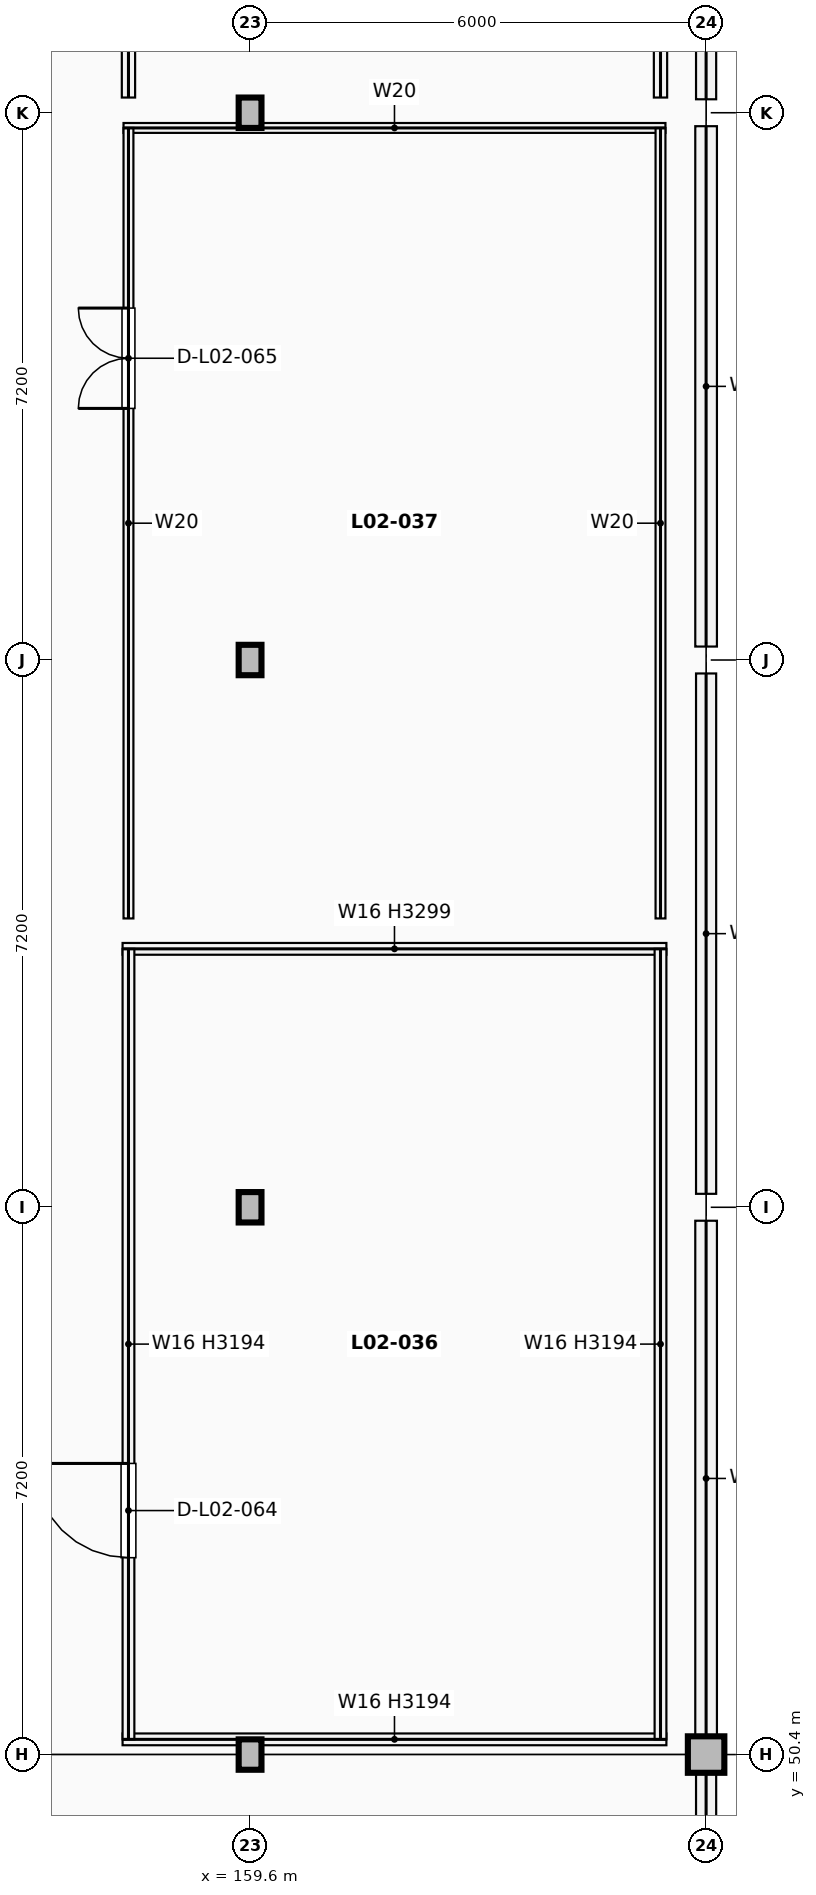
"""IFC4 building model, lengths in metres.
Left out: names, types, materials, properties, quantities, classifications, styles, units other than length and angle.
Written with IfcOpenShell. Run it as: python <this file> out.ifc"""

import sys

from ifc_helpers import new_model, si_unit, direction, frame, frame_2d, origin, origin_2d, place, context, subcontext, project, spatial, rectangle, i_section, extrude, element, fill, save


model = new_model("IFC4")
c1 = context("Model", 3, precision=1e-05, world=origin(), true_north=direction((0.0, 1.0)))
c2 = subcontext(c1, "Body", "Model", "MODEL_VIEW")
j1 = project(units=[si_unit("LENGTHUNIT", "METRE"), si_unit("PLANEANGLEUNIT", "RADIAN")], contexts=[c1])
p1 = place(None, origin())
s1 = spatial("IfcSite", under=j1, at=p1, CompositionType="ELEMENT")
p2 = place(p1, origin())
s2 = spatial("IfcBuilding", under=s1, at=p2, CompositionType="ELEMENT")
p3 = place(p2, frame((0.0, 0.0, 9.52)))
s3 = spatial("IfcBuildingStorey", under=s2, at=p3, CompositionType="ELEMENT", Elevation=9.52)
for number, where, z_axis, x_axis in (
    (1, (159.6, 50.4, 0.0), (0.0, 0.0, 1.0), (1.0, 0.0, 0.0)),
    (2, (159.6, 57.6, 0.0), (0.0, 0.0, 1.0), (1.0, 0.0, 0.0)),
    (3, (159.6, 64.8, 0.0), (0.0, 0.0, 1.0), (1.0, 0.0, 0.0)),
    (4, (159.6, 72.0, 0.0), (0.0, 0.0, 1.0), (1.0, 0.0, 0.0)),
):
    element("IfcColumn", number, at=place(p3, frame(where, z_axis=z_axis, x_axis=x_axis)), inside=s3, PredefinedType="COLUMN", context=c2, shape_type="SweptSolid", body=[
        extrude(i_section(OverallWidth=0.3, OverallDepth=0.4, WebThickness=0.013, FlangeThickness=0.024, at=origin_2d()), origin(), (0.0, 0.0, 1.0), 4.08),
    ])
p4 = place(p3, frame((165.6, 50.4, 0.0), z_axis=(0.0, 0.0, 1.0), x_axis=(1.0, 0.0, 0.0)))
e5 = element("IfcColumn", 5, at=p4, inside=s3, PredefinedType="COLUMN", context=c2, shape_type="SweptSolid", body=[
    extrude(rectangle(XDim=0.48, YDim=0.48, at=origin_2d()), origin(), (0.0, 0.0, 1.0), 4.08),
])
p5 = place(p3, frame((165.6, 44.642, 0.0), z_axis=(0.0, 0.0, 1.0), x_axis=(0.0, 1.0, 0.0)))
e6 = element("IfcWall", 6, at=p5, inside=s3, PredefinedType="SOLIDWALL", context=c2, shape_type="SweptSolid", body=[
    extrude(rectangle(XDim=5.516, YDim=0.265, at=frame_2d((2.758, 0.0))), origin(), (0.0, 0.0, 1.0), 3.194),
])
p6 = place(p3, frame((165.6, 50.642, 0.0), z_axis=(0.0, 0.0, 1.0), x_axis=(0.0, 1.0, 0.0)))
e7 = element("IfcWall", 7, at=p6, inside=s3, PredefinedType="SOLIDWALL", context=c2, shape_type="SweptSolid", body=[
    extrude(rectangle(XDim=6.781, YDim=0.285, at=frame_2d((3.391, 0.0))), origin(), (0.0, 0.0, 1.0), 3.194),
])
p7 = place(p3, frame((165.6, 57.777, 0.0), z_axis=(0.0, 0.0, 1.0), x_axis=(0.0, 1.0, 0.0)))
e8 = element("IfcWall", 8, at=p7, inside=s3, PredefinedType="SOLIDWALL", context=c2, shape_type="SweptSolid", body=[
    extrude(rectangle(XDim=6.846, YDim=0.265, at=frame_2d((3.423, 0.0))), origin(), (0.0, 0.0, 1.0), 3.194),
])
p8 = place(p3, frame((165.6, 64.977, 0.0), z_axis=(0.0, 0.0, 1.0), x_axis=(0.0, 1.0, 0.0)))
e9 = element("IfcWall", 9, at=p8, inside=s3, PredefinedType="SOLIDWALL", context=c2, shape_type="SweptSolid", body=[
    extrude(rectangle(XDim=6.846, YDim=0.285, at=frame_2d((3.423, 0.0))), origin(), (0.0, 0.0, 1.0), 3.194),
])
p9 = place(p3, frame((165.6, 72.177, 0.0), z_axis=(0.0, 0.0, 1.0), x_axis=(0.0, 1.0, 0.0)))
e10 = element("IfcWall", 10, at=p9, inside=s3, PredefinedType="SOLIDWALL", context=c2, shape_type="SweptSolid", body=[
    extrude(rectangle(XDim=6.781, YDim=0.265, at=frame_2d((3.391, 0.0))), origin(), (0.0, 0.0, 1.0), 3.194),
])
p10 = place(p3, frame((157.923, 50.6, 0.0), z_axis=(0.0, 0.0, 1.0), x_axis=(1.0, 0.0, 0.0)))
e11 = element("IfcWall", 11, at=p10, inside=s3, PredefinedType="PARTITIONING", context=c2, shape_type="SweptSolid", body=[
    extrude(rectangle(XDim=7.155, YDim=0.155, at=frame_2d((3.577, 0.0))), origin(), (0.0, 0.0, 1.0), 3.194),
])
p11 = place(p3, frame((157.923, 61.0, 0.0), z_axis=(0.0, 0.0, 1.0), x_axis=(1.0, 0.0, 0.0)))
e12 = element("IfcWall", 12, at=p11, inside=s3, PredefinedType="PARTITIONING", context=c2, shape_type="SweptSolid", body=[
    extrude(rectangle(XDim=7.155, YDim=0.155, at=frame_2d((3.577, 0.0))), origin(), (0.0, 0.0, 1.0), 3.299),
])
p12 = place(p3, frame((158.0, 50.6, 0.0), z_axis=(0.0, 0.0, 1.0), x_axis=(0.0, 1.0, 0.0)))
e13 = element("IfcWall", 13, at=p12, inside=s3, PredefinedType="PARTITIONING", context=c2, shape_type="SweptSolid", body=[
    extrude(rectangle(XDim=10.4, YDim=0.155, at=frame_2d((5.2, 0.0))), origin(), (0.0, 0.0, 1.0), 3.194),
])
p13 = place(p12, frame((2.39, 0.0, 0.0)))
e14 = element("IfcOpeningElement", 14, at=p13, cuts=e13, PredefinedType="OPENING", context=c2, shape_type="SweptSolid", body=[
    extrude(rectangle(XDim=1.24, YDim=2.2, at=frame_2d((0.62, 1.1))), frame((0.0, 0.087, 0.0), z_axis=(0.0, -1.0, 0.0), x_axis=(1.0, 0.0, 0.0)), (0.0, 0.0, 1.0), 0.175),
])
p14 = place(p3, frame((165.0, 50.6, 0.0), z_axis=(0.0, 0.0, 1.0), x_axis=(0.0, 1.0, 0.0)))
e15 = element("IfcWall", 15, at=p14, inside=s3, PredefinedType="PARTITIONING", context=c2, shape_type="SweptSolid", body=[
    extrude(rectangle(XDim=10.4, YDim=0.155, at=frame_2d((5.2, 0.0))), origin(), (0.0, 0.0, 1.0), 3.194),
])
p15 = place(p3, frame((157.935, 71.8, 0.0), z_axis=(0.0, 0.0, 1.0), x_axis=(1.0, 0.0, 0.0)))
e16 = element("IfcWall", 16, at=p15, inside=s3, PredefinedType="PARTITIONING", context=c2, shape_type="SweptSolid", body=[
    extrude(rectangle(XDim=7.13, YDim=0.13, at=frame_2d((3.565, 0.0))), origin(), (0.0, 0.0, 1.0), 3.194),
])
p16 = place(p3, frame((158.0, 61.4, 0.0), z_axis=(0.0, 0.0, 1.0), x_axis=(0.0, 1.0, 0.0)))
e17 = element("IfcWall", 17, at=p16, inside=s3, PredefinedType="PARTITIONING", context=c2, shape_type="SweptSolid", body=[
    extrude(rectangle(XDim=10.4, YDim=0.13, at=frame_2d((5.2, 0.0))), origin(), (0.0, 0.0, 1.0), 3.194),
])
p17 = place(p16, frame((6.71, 0.0, 0.0)))
e18 = element("IfcOpeningElement", 18, at=p17, cuts=e17, PredefinedType="OPENING", context=c2, shape_type="SweptSolid", body=[
    extrude(rectangle(XDim=1.32, YDim=2.22, at=frame_2d((0.66, 1.11))), frame((0.0, 0.075, 0.0), z_axis=(0.0, -1.0, 0.0), x_axis=(1.0, 0.0, 0.0)), (0.0, 0.0, 1.0), 0.15),
])
p18 = place(p3, frame((165.0, 61.4, 0.0), z_axis=(0.0, 0.0, 1.0), x_axis=(0.0, 1.0, 0.0)))
e19 = element("IfcWall", 19, at=p18, inside=s3, PredefinedType="PARTITIONING", context=c2, shape_type="SweptSolid", body=[
    extrude(rectangle(XDim=10.4, YDim=0.13, at=frame_2d((5.2, 0.0))), origin(), (0.0, 0.0, 1.0), 3.194),
])
p19 = place(p3, frame((158.0, 72.2, 0.0), z_axis=(0.0, 0.0, 1.0), x_axis=(0.0, 1.0, 0.0)))
e20 = element("IfcWall", 20, at=p19, inside=s3, PredefinedType="PARTITIONING", context=c2, shape_type="SweptSolid", body=[
    extrude(rectangle(XDim=9.6, YDim=0.175, at=frame_2d((4.8, 0.0))), origin(), (0.0, 0.0, 1.0), 3.194),
])
p20 = place(p19, frame((2.245, 0.0, 0.0)))
e21 = element("IfcOpeningElement", 21, at=p20, cuts=e20, PredefinedType="OPENING", context=c2, shape_type="SweptSolid", body=[
    extrude(rectangle(XDim=1.02, YDim=2.18, at=frame_2d((0.51, 1.09))), frame((0.0, 0.098, 0.0), z_axis=(0.0, -1.0, 0.0), x_axis=(1.0, 0.0, 0.0)), (0.0, 0.0, 1.0), 0.195),
])
p21 = place(p3, frame((165.0, 72.2, 0.0), z_axis=(0.0, 0.0, 1.0), x_axis=(0.0, 1.0, 0.0)))
e22 = element("IfcWall", 22, at=p21, inside=s3, PredefinedType="PARTITIONING", context=c2, shape_type="SweptSolid", body=[
    extrude(rectangle(XDim=9.6, YDim=0.175, at=frame_2d((4.8, 0.0))), origin(), (0.0, 0.0, 1.0), 3.194),
])
p22 = place(p13, origin())
e23 = element("IfcDoor", 23, at=p22, inside=s3, OperationType="SINGLE_SWING_RIGHT", PredefinedType="DOOR", context=c2, shape_type="SweptSolid", body=[
    extrude(rectangle(XDim=1.24, YDim=2.2, at=frame_2d((0.62, 1.1))), frame((0.0, 0.025, 0.0), z_axis=(0.0, -1.0, 0.0), x_axis=(1.0, 0.0, 0.0)), (0.0, 0.0, 1.0), 0.05),
])
fill(e14, e23)
p23 = place(p17, origin())
e24 = element("IfcDoor", 24, at=p23, inside=s3, OperationType="DOUBLE_DOOR_SINGLE_SWING", PredefinedType="DOOR", context=c2, shape_type="SweptSolid", body=[
    extrude(rectangle(XDim=1.32, YDim=2.22, at=frame_2d((0.66, 1.11))), frame((0.0, 0.025, 0.0), z_axis=(0.0, -1.0, 0.0), x_axis=(1.0, 0.0, 0.0)), (0.0, 0.0, 1.0), 0.05),
])
fill(e18, e24)
save(model, sys.argv[1])
